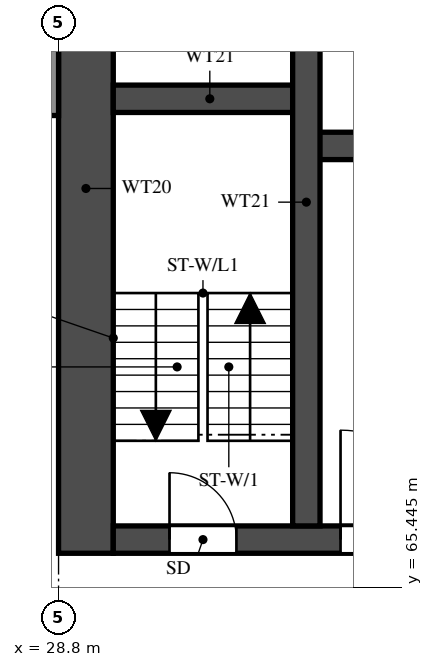
"""IFC4 building model, lengths in metres.
Left out: names, types, materials, properties, quantities, classifications, styles, units other than length and angle.
Written with IfcOpenShell. Run it as: python <this file> out.ifc"""

import sys

from ifc_helpers import new_model, si_unit, direction, frame, frame_2d, origin, place, context, subcontext, project, spatial, rectangle, extrude, element, fill, save


model = new_model("IFC4")
c1 = context("Model", 3, precision=1e-05, world=origin(), true_north=direction((0.0, 1.0)))
c2 = subcontext(c1, "Body", "Model", "MODEL_VIEW")
j1 = project(units=[si_unit("LENGTHUNIT", "METRE"), si_unit("PLANEANGLEUNIT", "RADIAN")], contexts=[c1])
p1 = place(None, origin())
s1 = spatial("IfcSite", under=j1, at=p1, CompositionType="ELEMENT")
p2 = place(p1, origin())
s2 = spatial("IfcBuilding", under=s1, at=p2, CompositionType="ELEMENT")
p3 = place(p2, frame((0.0, 0.0, 58.5)))
s3 = spatial("IfcBuildingStorey", under=s2, at=p3, CompositionType="ELEMENT", Elevation=58.5)
p4 = place(p3, frame((29.25, 66.0, 0.0), z_axis=(0.0, 0.0, 1.0), x_axis=(0.0, 1.0, 0.0)))
e1 = element("IfcWall", 1, at=p4, inside=s3, PredefinedType="SHEAR", context=c2, shape_type="SweptSolid", body=[
    extrude(rectangle(XDim=12.0, YDim=0.9, at=frame_2d((6.0, 0.0))), origin(), (0.0, 0.0, 1.0), 3.18),
])
p5 = place(p3, frame((29.7, 66.225, 0.0), z_axis=(0.0, 0.0, 1.0), x_axis=(1.0, 0.0, 0.0)))
e2 = element("IfcWall", 2, at=p5, inside=s3, PredefinedType="SHEAR", context=c2, shape_type="SweptSolid", body=[
    extrude(rectangle(XDim=41.4, YDim=0.45, at=frame_2d((20.7, 0.0))), origin(), (0.0, 0.0, 1.0), 3.18),
])
p6 = place(p5, frame((0.925, 0.0, 0.0)))
e3 = element("IfcOpeningElement", 3, at=p6, cuts=e2, PredefinedType="OPENING", context=c2, shape_type="SweptSolid", body=[
    extrude(rectangle(XDim=1.1, YDim=2.1, at=frame_2d((0.55, 1.05))), frame((0.0, 0.235, 0.0), z_axis=(0.0, -1.0, 0.0), x_axis=(1.0, 0.0, 0.0)), (0.0, 0.0, 1.0), 0.47),
])
p7 = place(p5, frame((3.738, 0.0, 0.0)))
e4 = element("IfcOpeningElement", 4, at=p7, cuts=e2, PredefinedType="OPENING", context=c2, shape_type="SweptSolid", body=[
    extrude(rectangle(XDim=1.8, YDim=2.1, at=frame_2d((0.9, 1.05))), frame((0.0, 0.235, 0.0), z_axis=(0.0, -1.0, 0.0), x_axis=(1.0, 0.0, 0.0)), (0.0, 0.0, 1.0), 0.47),
])
p8 = place(p3, frame((32.875, 72.7, 0.0), z_axis=(0.0, 0.0, 1.0), x_axis=(1.0, 0.0, 0.0)))
e5 = element("IfcWall", 5, at=p8, inside=s3, PredefinedType="SHEAR", context=c2, shape_type="SweptSolid", body=[
    extrude(rectangle(XDim=35.05, YDim=0.45, at=frame_2d((17.525, 0.0))), origin(), (0.0, 0.0, 1.0), 3.18),
])
p9 = place(p8, frame((19.8, 0.0, 0.0)))
e6 = element("IfcOpeningElement", 6, at=p9, cuts=e5, PredefinedType="OPENING", context=c2, shape_type="SweptSolid", body=[
    extrude(rectangle(XDim=1.1, YDim=2.1, at=frame_2d((0.55, 1.05))), frame((0.0, 0.235, 0.0), z_axis=(0.0, -1.0, 0.0), x_axis=(1.0, 0.0, 0.0)), (0.0, 0.0, 1.0), 0.47),
])
p10 = place(p8, frame((27.65, 0.0, 0.0)))
e7 = element("IfcOpeningElement", 7, at=p10, cuts=e5, PredefinedType="OPENING", context=c2, shape_type="SweptSolid", body=[
    extrude(rectangle(XDim=1.1, YDim=2.1, at=frame_2d((0.55, 1.05))), frame((0.0, 0.235, 0.0), z_axis=(0.0, -1.0, 0.0), x_axis=(1.0, 0.0, 0.0)), (0.0, 0.0, 1.0), 0.47),
])
p11 = place(p8, frame((30.25, 0.0, 0.0)))
e8 = element("IfcOpeningElement", 8, at=p11, cuts=e5, PredefinedType="OPENING", context=c2, shape_type="SweptSolid", body=[
    extrude(rectangle(XDim=1.1, YDim=2.1, at=frame_2d((0.55, 1.05))), frame((0.0, 0.235, 0.0), z_axis=(0.0, -1.0, 0.0), x_axis=(1.0, 0.0, 0.0)), (0.0, 0.0, 1.0), 0.47),
])
p12 = place(p8, frame((3.75, 0.0, 0.0)))
e9 = element("IfcOpeningElement", 9, at=p12, cuts=e5, PredefinedType="OPENING", context=c2, shape_type="SweptSolid", body=[
    extrude(rectangle(XDim=1.1, YDim=2.1, at=frame_2d((0.55, 1.05))), frame((0.0, 0.235, 0.0), z_axis=(0.0, -1.0, 0.0), x_axis=(1.0, 0.0, 0.0)), (0.0, 0.0, 1.0), 0.47),
])
p13 = place(p8, frame((6.5, 0.0, 0.0)))
e10 = element("IfcOpeningElement", 10, at=p13, cuts=e5, PredefinedType="OPENING", context=c2, shape_type="SweptSolid", body=[
    extrude(rectangle(XDim=1.1, YDim=2.1, at=frame_2d((0.55, 1.05))), frame((0.0, 0.235, 0.0), z_axis=(0.0, -1.0, 0.0), x_axis=(1.0, 0.0, 0.0)), (0.0, 0.0, 1.0), 0.47),
])
p14 = place(p8, frame((9.25, 0.0, 0.0)))
e11 = element("IfcOpeningElement", 11, at=p14, cuts=e5, PredefinedType="OPENING", context=c2, shape_type="SweptSolid", body=[
    extrude(rectangle(XDim=1.1, YDim=2.1, at=frame_2d((0.55, 1.05))), frame((0.0, 0.235, 0.0), z_axis=(0.0, -1.0, 0.0), x_axis=(1.0, 0.0, 0.0)), (0.0, 0.0, 1.0), 0.47),
])
p15 = place(p8, frame((12.0, 0.0, 0.0)))
e12 = element("IfcOpeningElement", 12, at=p15, cuts=e5, PredefinedType="OPENING", context=c2, shape_type="SweptSolid", body=[
    extrude(rectangle(XDim=1.1, YDim=2.1, at=frame_2d((0.55, 1.05))), frame((0.0, 0.235, 0.0), z_axis=(0.0, -1.0, 0.0), x_axis=(1.0, 0.0, 0.0)), (0.0, 0.0, 1.0), 0.47),
])
p16 = place(p8, frame((14.75, 0.0, 0.0)))
e13 = element("IfcOpeningElement", 13, at=p16, cuts=e5, PredefinedType="OPENING", context=c2, shape_type="SweptSolid", body=[
    extrude(rectangle(XDim=1.1, YDim=2.1, at=frame_2d((0.55, 1.05))), frame((0.0, 0.235, 0.0), z_axis=(0.0, -1.0, 0.0), x_axis=(1.0, 0.0, 0.0)), (0.0, 0.0, 1.0), 0.47),
])
p17 = place(p8, frame((17.5, 0.0, 0.0)))
e14 = element("IfcOpeningElement", 14, at=p17, cuts=e5, PredefinedType="OPENING", context=c2, shape_type="SweptSolid", body=[
    extrude(rectangle(XDim=1.1, YDim=2.1, at=frame_2d((0.55, 1.05))), frame((0.0, 0.235, 0.0), z_axis=(0.0, -1.0, 0.0), x_axis=(1.0, 0.0, 0.0)), (0.0, 0.0, 1.0), 0.47),
])
p18 = place(p8, frame((0.913, 0.0, 0.0)))
e15 = element("IfcOpeningElement", 15, at=p18, cuts=e5, PredefinedType="OPENING", context=c2, shape_type="SweptSolid", body=[
    extrude(rectangle(XDim=1.1, YDim=2.1, at=frame_2d((0.55, 1.05))), frame((0.0, 0.235, 0.0), z_axis=(0.0, -1.0, 0.0), x_axis=(1.0, 0.0, 0.0)), (0.0, 0.0, 1.0), 0.47),
])
p19 = place(p3, frame((29.7, 73.475, 0.0), z_axis=(0.0, 0.0, 1.0), x_axis=(1.0, 0.0, 0.0)))
e16 = element("IfcWall", 16, at=p19, inside=s3, PredefinedType="SHEAR", context=c2, shape_type="SweptSolid", body=[
    extrude(rectangle(XDim=3.175, YDim=0.45, at=frame_2d((1.587, 0.0))), origin(), (0.0, 0.0, 1.0), 3.18),
])
p20 = place(p3, frame((32.875, 66.45, 0.0), z_axis=(0.0, 0.0, 1.0), x_axis=(0.0, 1.0, 0.0)))
e17 = element("IfcWall", 17, at=p20, inside=s3, PredefinedType="SHEAR", context=c2, shape_type="SweptSolid", body=[
    extrude(rectangle(XDim=10.65, YDim=0.45, at=frame_2d((5.325, 0.0))), origin(), (0.0, 0.0, 1.0), 3.18),
])
p21 = place(p3, frame((28.7, 73.2, 0.0), z_axis=(0.0, 0.0, 1.0), x_axis=(0.0, 1.0, 0.0)))
e18 = element("IfcWall", 18, at=p21, inside=s3, PredefinedType="SOLIDWALL", context=c2, shape_type="SweptSolid", body=[
    extrude(rectangle(XDim=4.8, YDim=0.2, at=frame_2d((2.4, 0.0))), origin(), (0.0, 0.0, 1.0), 3.18),
])
p22 = place(p6, origin())
e19 = element("IfcDoor", 19, at=p22, inside=s3, OperationType="SINGLE_SWING_LEFT", PredefinedType="DOOR", context=c2, shape_type="SweptSolid", body=[
    extrude(rectangle(XDim=1.1, YDim=2.1, at=frame_2d((0.55, 1.05))), frame((0.0, 0.025, 0.0), z_axis=(0.0, -1.0, 0.0), x_axis=(1.0, 0.0, 0.0)), (0.0, 0.0, 1.0), 0.05),
])
fill(e3, e19)
p23 = place(p7, origin())
e20 = element("IfcDoor", 20, at=p23, inside=s3, OperationType="DOUBLE_DOOR_SINGLE_SWING", PredefinedType="DOOR", context=c2, shape_type="SweptSolid", body=[
    extrude(rectangle(XDim=1.8, YDim=2.1, at=frame_2d((0.9, 1.05))), frame((0.0, 0.025, 0.0), z_axis=(0.0, -1.0, 0.0), x_axis=(1.0, 0.0, 0.0)), (0.0, 0.0, 1.0), 0.05),
])
fill(e4, e20)
save(model, sys.argv[1])
